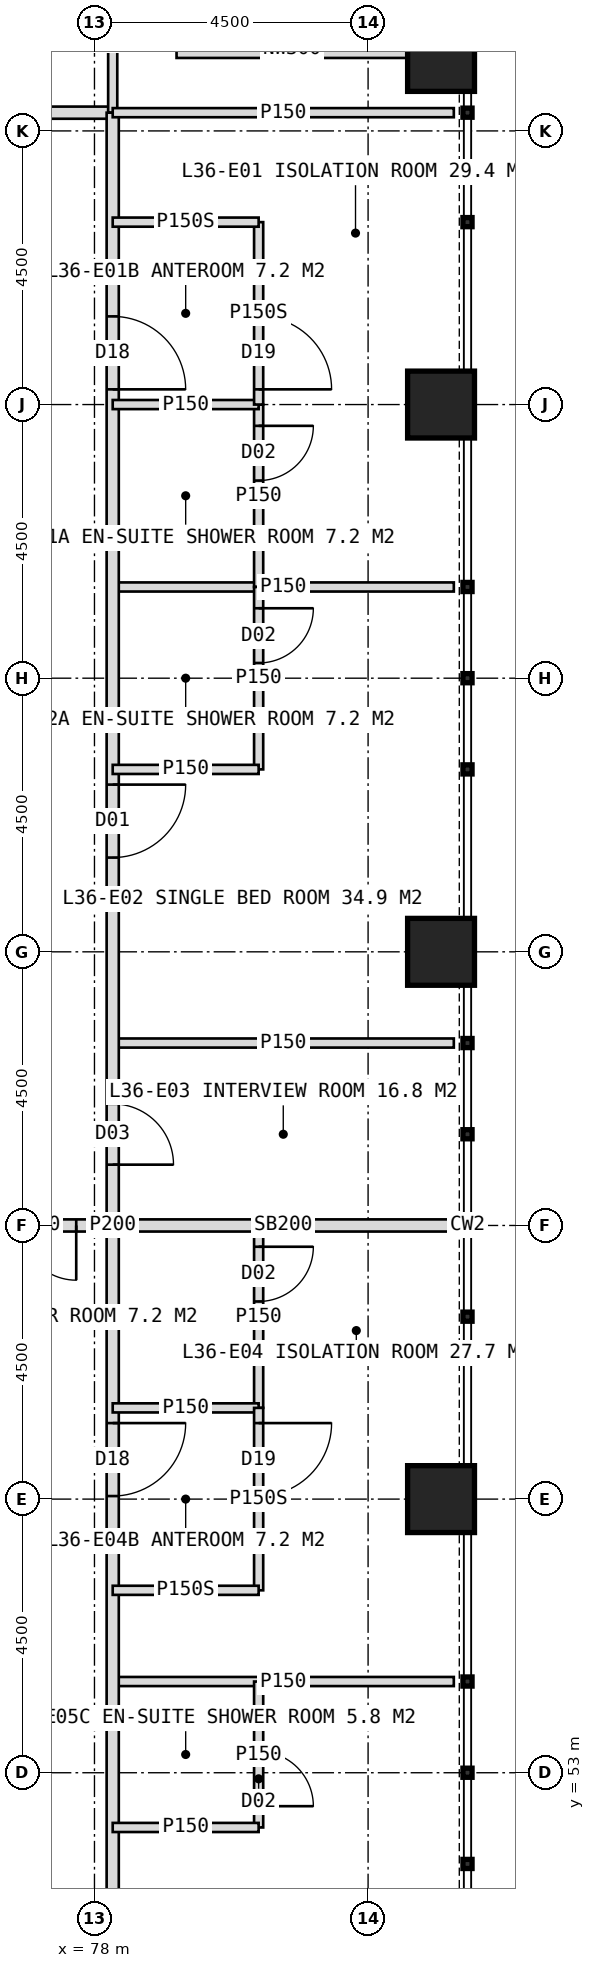
"""IFC4 building model, lengths in metres.
Left out: names, types, materials, properties, quantities, classifications, styles, units other than length and angle.
Written with IfcOpenShell. Run it as: python <this file> out.ifc"""

import sys

from ifc_helpers import new_model, si_unit, direction, frame, frame_2d, origin, origin_2d, place, context, subcontext, project, spatial, rectangle, hollow_rectangle, extrude, element, fill, save


model = new_model("IFC4")
c1 = context("Model", 3, precision=1e-05, world=origin(), true_north=direction((0.0, 1.0)))
c2 = subcontext(c1, "Body", "Model", "MODEL_VIEW")
j1 = project(units=[si_unit("LENGTHUNIT", "METRE"), si_unit("PLANEANGLEUNIT", "RADIAN")], contexts=[c1])
p1 = place(None, origin())
s1 = spatial("IfcSite", under=j1, at=p1, CompositionType="ELEMENT")
p2 = place(p1, origin())
s2 = spatial("IfcBuilding", under=s1, at=p2, CompositionType="ELEMENT")
p3 = place(p2, frame((0.0, 0.0, 152.0)))
s3 = spatial("IfcBuildingStorey", under=s2, at=p3, CompositionType="ELEMENT", Elevation=152.0)
for number, where, z_axis, x_axis in (
    (1, (83.7, 57.5, 0.0), (0.0, 0.0, 1.0), (1.0, 0.0, 0.0)),
    (2, (83.7, 66.5, 0.0), (0.0, 0.0, 1.0), (1.0, 0.0, 0.0)),
    (3, (83.7, 75.5, 0.0), (0.0, 0.0, 1.0), (1.0, 0.0, 0.0)),
    (4, (83.7, 81.2, 0.0), (0.0, 0.0, 1.0), (1.0, 0.0, 0.0)),
):
    element("IfcColumn", number, at=place(p3, frame(where, z_axis=z_axis, x_axis=x_axis)), inside=s3, PredefinedType="COLUMN", context=c2, shape_type="SweptSolid", body=[
        extrude(hollow_rectangle(XDim=1.1, YDim=1.1, WallThickness=0.1, at=origin_2d()), origin(), (0.0, 0.0, 1.0), 4.0),
    ])
p4 = place(p3, frame((79.35, 81.35, 0.0), z_axis=(0.0, 0.0, 1.0), x_axis=(1.0, 0.0, 0.0)))
e5 = element("IfcWall", 5, at=p4, inside=s3, PredefinedType="ELEMENTEDWALL", context=c2, shape_type="SweptSolid", body=[
    extrude(rectangle(XDim=3.8, YDim=0.3, at=frame_2d((1.9, 0.0))), origin(), (0.0, 0.0, 1.0), 4.0),
])
p5 = place(p3, frame((41.7, 80.3, 0.0), z_axis=(0.0, 0.0, 1.0), x_axis=(1.0, 0.0, 0.0)))
e6 = element("IfcWall", 6, at=p5, inside=s3, PredefinedType="PARTITIONING", context=c2, shape_type="SweptSolid", body=[
    extrude(rectangle(XDim=36.6, YDim=0.2, at=frame_2d((18.3, 0.0))), origin(), (0.0, 0.0, 1.0), 3.75),
])
p6 = place(p5, frame((3.35, 0.0, 0.0)))
e7 = element("IfcOpeningElement", 7, at=p6, cuts=e6, PredefinedType="OPENING", context=c2, shape_type="SweptSolid", body=[
    extrude(rectangle(XDim=1.2, YDim=2.2, at=frame_2d((0.6, 1.1))), frame((0.0, 0.11, 0.0), z_axis=(0.0, -1.0, 0.0), x_axis=(1.0, 0.0, 0.0)), (0.0, 0.0, 1.0), 0.22),
])
p7 = place(p5, frame((8.8, 0.0, 0.0)))
e8 = element("IfcOpeningElement", 8, at=p7, cuts=e6, PredefinedType="OPENING", context=c2, shape_type="SweptSolid", body=[
    extrude(rectangle(XDim=1.0, YDim=2.1, at=frame_2d((0.5, 1.05))), frame((0.0, 0.11, 0.0), z_axis=(0.0, -1.0, 0.0), x_axis=(1.0, 0.0, 0.0)), (0.0, 0.0, 1.0), 0.22),
])
p8 = place(p5, frame((15.35, 0.0, 0.0)))
e9 = element("IfcOpeningElement", 9, at=p8, cuts=e6, PredefinedType="OPENING", context=c2, shape_type="SweptSolid", body=[
    extrude(rectangle(XDim=1.2, YDim=2.2, at=frame_2d((0.6, 1.1))), frame((0.0, 0.11, 0.0), z_axis=(0.0, -1.0, 0.0), x_axis=(1.0, 0.0, 0.0)), (0.0, 0.0, 1.0), 0.22),
])
p9 = place(p5, frame((22.45, 0.0, 0.0)))
e10 = element("IfcOpeningElement", 10, at=p9, cuts=e6, PredefinedType="OPENING", context=c2, shape_type="SweptSolid", body=[
    extrude(rectangle(XDim=1.2, YDim=2.2, at=frame_2d((0.6, 1.1))), frame((0.0, 0.11, 0.0), z_axis=(0.0, -1.0, 0.0), x_axis=(1.0, 0.0, 0.0)), (0.0, 0.0, 1.0), 0.22),
])
p10 = place(p3, frame((78.3, 80.3, 0.0), z_axis=(0.0, 0.0, 1.0), x_axis=(0.0, 1.0, 0.0)))
e11 = element("IfcWall", 11, at=p10, inside=s3, PredefinedType="PARTITIONING", context=c2, shape_type="SweptSolid", body=[
    extrude(rectangle(XDim=2.4, YDim=0.15, at=frame_2d((1.2, 0.0))), origin(), (0.0, 0.0, 1.0), 3.75),
])
for number, where, z_axis, x_axis in (
    (12, (78.3, 72.5, 0.0), (0.0, 0.0, 1.0), (1.0, 0.0, 0.0)),
    (13, (78.3, 65.0, 0.0), (0.0, 0.0, 1.0), (1.0, 0.0, 0.0)),
):
    element("IfcWall", number, at=place(p3, frame(where, z_axis=z_axis, x_axis=x_axis)), inside=s3, PredefinedType="PARTITIONING", context=c2, shape_type="SweptSolid", body=[
        extrude(rectangle(XDim=5.61, YDim=0.15, at=frame_2d((2.805, 0.0))), origin(), (0.0, 0.0, 1.0), 3.75),
    ])
p11 = place(p3, frame((78.3, 62.0, 0.0), z_axis=(0.0, 0.0, 1.0), x_axis=(1.0, 0.0, 0.0)))
e14 = element("IfcWall", 14, at=p11, inside=s3, PredefinedType="SOLIDWALL", context=c2, shape_type="SweptSolid", body=[
    extrude(rectangle(XDim=5.61, YDim=0.2, at=frame_2d((2.805, 0.0))), origin(), (0.0, 0.0, 1.0), 2.95),
])
p12 = place(p3, frame((78.3, 54.5, 0.0), z_axis=(0.0, 0.0, 1.0), x_axis=(1.0, 0.0, 0.0)))
e15 = element("IfcWall", 15, at=p12, inside=s3, PredefinedType="PARTITIONING", context=c2, shape_type="SweptSolid", body=[
    extrude(rectangle(XDim=5.61, YDim=0.15, at=frame_2d((2.805, 0.0))), origin(), (0.0, 0.0, 1.0), 3.75),
])
p13 = place(p3, frame((78.3, 80.3, 0.0), z_axis=(0.0, 0.0, 1.0), x_axis=(0.0, -1.0, 0.0)))
e16 = element("IfcWall", 16, at=p13, inside=s3, PredefinedType="PARTITIONING", context=c2, shape_type="SweptSolid", body=[
    extrude(rectangle(XDim=36.6, YDim=0.2, at=frame_2d((18.3, 0.0))), origin(), (0.0, 0.0, 1.0), 3.75),
])
p14 = place(p13, frame((3.35, 0.0, 0.0)))
e17 = element("IfcOpeningElement", 17, at=p14, cuts=e16, PredefinedType="OPENING", context=c2, shape_type="SweptSolid", body=[
    extrude(rectangle(XDim=1.2, YDim=2.2, at=frame_2d((0.6, 1.1))), frame((0.0, 0.11, 0.0), z_axis=(0.0, -1.0, 0.0), x_axis=(1.0, 0.0, 0.0)), (0.0, 0.0, 1.0), 0.22),
])
p15 = place(p13, frame((11.05, 0.0, 0.0)))
e18 = element("IfcOpeningElement", 18, at=p15, cuts=e16, PredefinedType="OPENING", context=c2, shape_type="SweptSolid", body=[
    extrude(rectangle(XDim=1.2, YDim=2.2, at=frame_2d((0.6, 1.1))), frame((0.0, 0.11, 0.0), z_axis=(0.0, -1.0, 0.0), x_axis=(1.0, 0.0, 0.0)), (0.0, 0.0, 1.0), 0.22),
])
p16 = place(p13, frame((16.3, 0.0, 0.0)))
e19 = element("IfcOpeningElement", 19, at=p16, cuts=e16, PredefinedType="OPENING", context=c2, shape_type="SweptSolid", body=[
    extrude(rectangle(XDim=1.0, YDim=2.1, at=frame_2d((0.5, 1.05))), frame((0.0, 0.11, 0.0), z_axis=(0.0, -1.0, 0.0), x_axis=(1.0, 0.0, 0.0)), (0.0, 0.0, 1.0), 0.22),
])
p17 = place(p13, frame((21.55, 0.0, 0.0)))
e20 = element("IfcOpeningElement", 20, at=p17, cuts=e16, PredefinedType="OPENING", context=c2, shape_type="SweptSolid", body=[
    extrude(rectangle(XDim=1.2, YDim=2.2, at=frame_2d((0.6, 1.1))), frame((0.0, 0.11, 0.0), z_axis=(0.0, -1.0, 0.0), x_axis=(1.0, 0.0, 0.0)), (0.0, 0.0, 1.0), 0.22),
])
p18 = place(p13, frame((32.75, 0.0, 0.0)))
e21 = element("IfcOpeningElement", 21, at=p18, cuts=e16, PredefinedType="OPENING", context=c2, shape_type="SweptSolid", body=[
    extrude(rectangle(XDim=1.2, YDim=2.2, at=frame_2d((0.6, 1.1))), frame((0.0, 0.11, 0.0), z_axis=(0.0, -1.0, 0.0), x_axis=(1.0, 0.0, 0.0)), (0.0, 0.0, 1.0), 0.22),
])
p19 = place(p3, frame((78.3, 80.3, 0.0), z_axis=(0.0, 0.0, 1.0), x_axis=(1.0, 0.0, 0.0)))
e22 = element("IfcWall", 22, at=p19, inside=s3, PredefinedType="PARTITIONING", context=c2, shape_type="SweptSolid", body=[
    extrude(rectangle(XDim=5.61, YDim=0.15, at=frame_2d((2.805, 0.0))), origin(), (0.0, 0.0, 1.0), 3.75),
])
p20 = place(p3, frame((80.7, 75.5, 0.0), z_axis=(0.0, 0.0, 1.0), x_axis=(0.0, -1.0, 0.0)))
e23 = element("IfcWall", 23, at=p20, inside=s3, PredefinedType="PARTITIONING", context=c2, shape_type="SweptSolid", body=[
    extrude(rectangle(XDim=3.0, YDim=0.15, at=frame_2d((1.5, 0.0))), origin(), (0.0, 0.0, 1.0), 3.75),
])
p21 = place(p20, frame((0.35, 0.0, 0.0)))
e24 = element("IfcOpeningElement", 24, at=p21, cuts=e23, PredefinedType="OPENING", context=c2, shape_type="SweptSolid", body=[
    extrude(rectangle(XDim=0.9, YDim=2.1, at=frame_2d((0.45, 1.05))), frame((0.0, 0.085, 0.0), z_axis=(0.0, -1.0, 0.0), x_axis=(1.0, 0.0, 0.0)), (0.0, 0.0, 1.0), 0.17),
])
p22 = place(p3, frame((78.3, 75.5, 0.0), z_axis=(0.0, 0.0, 1.0), x_axis=(1.0, 0.0, 0.0)))
e25 = element("IfcWall", 25, at=p22, inside=s3, PredefinedType="PARTITIONING", context=c2, shape_type="SweptSolid", body=[
    extrude(rectangle(XDim=2.4, YDim=0.15, at=frame_2d((1.2, 0.0))), origin(), (0.0, 0.0, 1.0), 2.95),
])
p23 = place(p3, frame((80.7, 78.5, 0.0), z_axis=(0.0, 0.0, 1.0), x_axis=(0.0, -1.0, 0.0)))
e26 = element("IfcWall", 26, at=p23, inside=s3, PredefinedType="PARTITIONING", context=c2, shape_type="SweptSolid", body=[
    extrude(rectangle(XDim=3.0, YDim=0.15, at=frame_2d((1.5, 0.0))), origin(), (0.0, 0.0, 1.0), 3.75),
])
p24 = place(p23, frame((1.55, 0.0, 0.0)))
e27 = element("IfcOpeningElement", 27, at=p24, cuts=e26, PredefinedType="OPENING", context=c2, shape_type="SweptSolid", body=[
    extrude(rectangle(XDim=1.2, YDim=2.2, at=frame_2d((0.6, 1.1))), frame((0.0, 0.085, 0.0), z_axis=(0.0, -1.0, 0.0), x_axis=(1.0, 0.0, 0.0)), (0.0, 0.0, 1.0), 0.17),
])
p25 = place(p3, frame((78.3, 78.5, 0.0), z_axis=(0.0, 0.0, 1.0), x_axis=(1.0, 0.0, 0.0)))
e28 = element("IfcWall", 28, at=p25, inside=s3, PredefinedType="PARTITIONING", context=c2, shape_type="SweptSolid", body=[
    extrude(rectangle(XDim=2.4, YDim=0.15, at=frame_2d((1.2, 0.0))), origin(), (0.0, 0.0, 1.0), 3.75),
])
p26 = place(p3, frame((80.7, 72.5, 0.0), z_axis=(0.0, 0.0, 1.0), x_axis=(0.0, -1.0, 0.0)))
e29 = element("IfcWall", 29, at=p26, inside=s3, PredefinedType="PARTITIONING", context=c2, shape_type="SweptSolid", body=[
    extrude(rectangle(XDim=3.0, YDim=0.15, at=frame_2d((1.5, 0.0))), origin(), (0.0, 0.0, 1.0), 3.75),
])
p27 = place(p26, frame((0.35, 0.0, 0.0)))
e30 = element("IfcOpeningElement", 30, at=p27, cuts=e29, PredefinedType="OPENING", context=c2, shape_type="SweptSolid", body=[
    extrude(rectangle(XDim=0.9, YDim=2.1, at=frame_2d((0.45, 1.05))), frame((0.0, 0.085, 0.0), z_axis=(0.0, -1.0, 0.0), x_axis=(1.0, 0.0, 0.0)), (0.0, 0.0, 1.0), 0.17),
])
p28 = place(p3, frame((78.3, 69.5, 0.0), z_axis=(0.0, 0.0, 1.0), x_axis=(1.0, 0.0, 0.0)))
e31 = element("IfcWall", 31, at=p28, inside=s3, PredefinedType="PARTITIONING", context=c2, shape_type="SweptSolid", body=[
    extrude(rectangle(XDim=2.4, YDim=0.15, at=frame_2d((1.2, 0.0))), origin(), (0.0, 0.0, 1.0), 3.75),
])
p29 = place(p3, frame((80.7, 62.0, 0.0), z_axis=(0.0, 0.0, 1.0), x_axis=(0.0, -1.0, 0.0)))
e32 = element("IfcWall", 32, at=p29, inside=s3, PredefinedType="PARTITIONING", context=c2, shape_type="SweptSolid", body=[
    extrude(rectangle(XDim=3.0, YDim=0.15, at=frame_2d((1.5, 0.0))), origin(), (0.0, 0.0, 1.0), 3.75),
])
p30 = place(p29, frame((0.35, 0.0, 0.0)))
e33 = element("IfcOpeningElement", 33, at=p30, cuts=e32, PredefinedType="OPENING", context=c2, shape_type="SweptSolid", body=[
    extrude(rectangle(XDim=0.9, YDim=2.1, at=frame_2d((0.45, 1.05))), frame((0.0, 0.085, 0.0), z_axis=(0.0, -1.0, 0.0), x_axis=(1.0, 0.0, 0.0)), (0.0, 0.0, 1.0), 0.17),
])
p31 = place(p3, frame((78.3, 59.0, 0.0), z_axis=(0.0, 0.0, 1.0), x_axis=(1.0, 0.0, 0.0)))
e34 = element("IfcWall", 34, at=p31, inside=s3, PredefinedType="PARTITIONING", context=c2, shape_type="SweptSolid", body=[
    extrude(rectangle(XDim=2.4, YDim=0.15, at=frame_2d((1.2, 0.0))), origin(), (0.0, 0.0, 1.0), 3.75),
])
p32 = place(p3, frame((80.7, 59.0, 0.0), z_axis=(0.0, 0.0, 1.0), x_axis=(0.0, -1.0, 0.0)))
e35 = element("IfcWall", 35, at=p32, inside=s3, PredefinedType="PARTITIONING", context=c2, shape_type="SweptSolid", body=[
    extrude(rectangle(XDim=3.0, YDim=0.15, at=frame_2d((1.5, 0.0))), origin(), (0.0, 0.0, 1.0), 3.75),
])
p33 = place(p32, frame((0.25, 0.0, 0.0)))
e36 = element("IfcOpeningElement", 36, at=p33, cuts=e35, PredefinedType="OPENING", context=c2, shape_type="SweptSolid", body=[
    extrude(rectangle(XDim=1.2, YDim=2.2, at=frame_2d((0.6, 1.1))), frame((0.0, 0.085, 0.0), z_axis=(0.0, -1.0, 0.0), x_axis=(1.0, 0.0, 0.0)), (0.0, 0.0, 1.0), 0.17),
])
p34 = place(p3, frame((78.3, 56.0, 0.0), z_axis=(0.0, 0.0, 1.0), x_axis=(1.0, 0.0, 0.0)))
e37 = element("IfcWall", 37, at=p34, inside=s3, PredefinedType="PARTITIONING", context=c2, shape_type="SweptSolid", body=[
    extrude(rectangle(XDim=2.4, YDim=0.15, at=frame_2d((1.2, 0.0))), origin(), (0.0, 0.0, 1.0), 3.75),
])
p35 = place(p3, frame((80.7, 54.5, 0.0), z_axis=(0.0, 0.0, 1.0), x_axis=(0.0, -1.0, 0.0)))
e38 = element("IfcWall", 38, at=p35, inside=s3, PredefinedType="PARTITIONING", context=c2, shape_type="SweptSolid", body=[
    extrude(rectangle(XDim=2.4, YDim=0.15, at=frame_2d((1.2, 0.0))), origin(), (0.0, 0.0, 1.0), 3.75),
])
p36 = place(p35, frame((1.15, 0.0, 0.0)))
e39 = element("IfcOpeningElement", 39, at=p36, cuts=e38, PredefinedType="OPENING", context=c2, shape_type="SweptSolid", body=[
    extrude(rectangle(XDim=0.9, YDim=2.1, at=frame_2d((0.45, 1.05))), frame((0.0, 0.085, 0.0), z_axis=(0.0, -1.0, 0.0), x_axis=(1.0, 0.0, 0.0)), (0.0, 0.0, 1.0), 0.17),
])
p37 = place(p3, frame((78.3, 52.1, 0.0), z_axis=(0.0, 0.0, 1.0), x_axis=(1.0, 0.0, 0.0)))
e40 = element("IfcWall", 40, at=p37, inside=s3, PredefinedType="PARTITIONING", context=c2, shape_type="SweptSolid", body=[
    extrude(rectangle(XDim=2.4, YDim=0.15, at=frame_2d((1.2, 0.0))), origin(), (0.0, 0.0, 1.0), 3.75),
])
p38 = place(p3, frame((75.6, 62.0, 0.0), z_axis=(0.0, 0.0, 1.0), x_axis=(1.0, 0.0, 0.0)))
e41 = element("IfcWall", 41, at=p38, inside=s3, PredefinedType="SOLIDWALL", context=c2, shape_type="SweptSolid", body=[
    extrude(rectangle(XDim=2.7, YDim=0.2, at=frame_2d((1.35, 0.0))), origin(), (0.0, 0.0, 1.0), 2.95),
])
p39 = place(p38, frame((0.3, 0.0, 0.0)))
e42 = element("IfcOpeningElement", 42, at=p39, cuts=e41, PredefinedType="OPENING", context=c2, shape_type="SweptSolid", body=[
    extrude(rectangle(XDim=1.8, YDim=2.2, at=frame_2d((0.9, 1.1))), frame((0.0, 0.11, 0.0), z_axis=(0.0, -1.0, 0.0), x_axis=(1.0, 0.0, 0.0)), (0.0, 0.0, 1.0), 0.22),
])
p40 = place(p24, origin())
e43 = element("IfcDoor", 43, at=p40, inside=s3, OperationType="SINGLE_SWING_RIGHT", PredefinedType="DOOR", context=c2, shape_type="SweptSolid", body=[
    extrude(rectangle(XDim=1.2, YDim=2.2, at=frame_2d((0.6, 1.1))), frame((0.0, 0.025, 0.0), z_axis=(0.0, -1.0, 0.0), x_axis=(1.0, 0.0, 0.0)), (0.0, 0.0, 1.0), 0.05),
])
fill(e27, e43)
p41 = place(p14, origin())
e44 = element("IfcDoor", 44, at=p41, inside=s3, OperationType="SINGLE_SWING_RIGHT", PredefinedType="DOOR", context=c2, shape_type="SweptSolid", body=[
    extrude(rectangle(XDim=1.2, YDim=2.2, at=frame_2d((0.6, 1.1))), frame((0.0, 0.025, 0.0), z_axis=(0.0, -1.0, 0.0), x_axis=(1.0, 0.0, 0.0)), (0.0, 0.0, 1.0), 0.05),
])
fill(e17, e44)
p42 = place(p21, origin())
e45 = element("IfcDoor", 45, at=p42, inside=s3, OperationType="SINGLE_SWING_LEFT", PredefinedType="DOOR", context=c2, shape_type="SweptSolid", body=[
    extrude(rectangle(XDim=0.9, YDim=2.1, at=frame_2d((0.45, 1.05))), frame((0.0, 0.025, 0.0), z_axis=(0.0, -1.0, 0.0), x_axis=(1.0, 0.0, 0.0)), (0.0, 0.0, 1.0), 0.05),
])
fill(e24, e45)
p43 = place(p15, origin())
e46 = element("IfcDoor", 46, at=p43, inside=s3, OperationType="SINGLE_SWING_LEFT", PredefinedType="DOOR", context=c2, shape_type="SweptSolid", body=[
    extrude(rectangle(XDim=1.2, YDim=2.2, at=frame_2d((0.6, 1.1))), frame((0.0, 0.025, 0.0), z_axis=(0.0, -1.0, 0.0), x_axis=(1.0, 0.0, 0.0)), (0.0, 0.0, 1.0), 0.05),
])
fill(e18, e46)
p44 = place(p27, origin())
e47 = element("IfcDoor", 47, at=p44, inside=s3, OperationType="SINGLE_SWING_LEFT", PredefinedType="DOOR", context=c2, shape_type="SweptSolid", body=[
    extrude(rectangle(XDim=0.9, YDim=2.1, at=frame_2d((0.45, 1.05))), frame((0.0, 0.025, 0.0), z_axis=(0.0, -1.0, 0.0), x_axis=(1.0, 0.0, 0.0)), (0.0, 0.0, 1.0), 0.05),
])
fill(e30, e47)
p45 = place(p16, origin())
e48 = element("IfcDoor", 48, at=p45, inside=s3, OperationType="SINGLE_SWING_RIGHT", PredefinedType="DOOR", context=c2, shape_type="SweptSolid", body=[
    extrude(rectangle(XDim=1.0, YDim=2.1, at=frame_2d((0.5, 1.05))), frame((0.0, 0.025, 0.0), z_axis=(0.0, -1.0, 0.0), x_axis=(1.0, 0.0, 0.0)), (0.0, 0.0, 1.0), 0.05),
])
fill(e19, e48)
p46 = place(p33, origin())
e49 = element("IfcDoor", 49, at=p46, inside=s3, OperationType="SINGLE_SWING_LEFT", PredefinedType="DOOR", context=c2, shape_type="SweptSolid", body=[
    extrude(rectangle(XDim=1.2, YDim=2.2, at=frame_2d((0.6, 1.1))), frame((0.0, 0.025, 0.0), z_axis=(0.0, -1.0, 0.0), x_axis=(1.0, 0.0, 0.0)), (0.0, 0.0, 1.0), 0.05),
])
fill(e36, e49)
p47 = place(p17, origin())
e50 = element("IfcDoor", 50, at=p47, inside=s3, OperationType="SINGLE_SWING_LEFT", PredefinedType="DOOR", context=c2, shape_type="SweptSolid", body=[
    extrude(rectangle(XDim=1.2, YDim=2.2, at=frame_2d((0.6, 1.1))), frame((0.0, 0.025, 0.0), z_axis=(0.0, -1.0, 0.0), x_axis=(1.0, 0.0, 0.0)), (0.0, 0.0, 1.0), 0.05),
])
fill(e20, e50)
p48 = place(p30, origin())
e51 = element("IfcDoor", 51, at=p48, inside=s3, OperationType="SINGLE_SWING_LEFT", PredefinedType="DOOR", context=c2, shape_type="SweptSolid", body=[
    extrude(rectangle(XDim=0.9, YDim=2.1, at=frame_2d((0.45, 1.05))), frame((0.0, 0.025, 0.0), z_axis=(0.0, -1.0, 0.0), x_axis=(1.0, 0.0, 0.0)), (0.0, 0.0, 1.0), 0.05),
])
fill(e33, e51)
p49 = place(p36, origin())
e52 = element("IfcDoor", 52, at=p49, inside=s3, OperationType="SINGLE_SWING_RIGHT", PredefinedType="DOOR", context=c2, shape_type="SweptSolid", body=[
    extrude(rectangle(XDim=0.9, YDim=2.1, at=frame_2d((0.45, 1.05))), frame((0.0, 0.025, 0.0), z_axis=(0.0, -1.0, 0.0), x_axis=(1.0, 0.0, 0.0)), (0.0, 0.0, 1.0), 0.05),
])
fill(e39, e52)
p50 = place(p39, origin())
e53 = element("IfcDoor", 53, at=p50, inside=s3, OperationType="DOUBLE_DOOR_DOUBLE_SWING", PredefinedType="DOOR", context=c2, shape_type="SweptSolid", body=[
    extrude(rectangle(XDim=1.8, YDim=2.2, at=frame_2d((0.9, 1.1))), frame((0.0, 0.025, 0.0), z_axis=(0.0, -1.0, 0.0), x_axis=(1.0, 0.0, 0.0)), (0.0, 0.0, 1.0), 0.05),
])
fill(e42, e53)
save(model, sys.argv[1])
